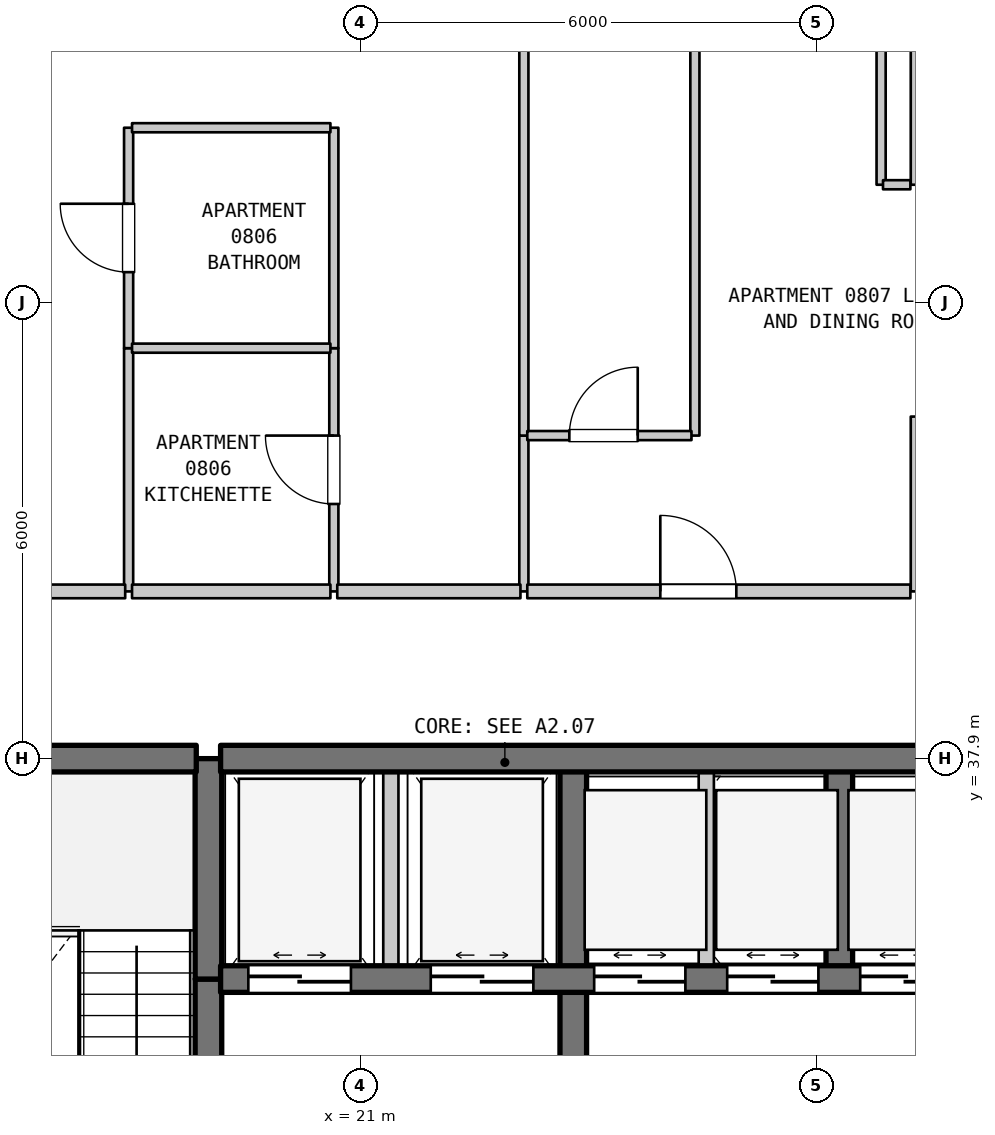
"""IFC4 building model, lengths in metres.
Left out: names, types, materials, properties, quantities, classifications, styles, units other than length and angle.
Written with IfcOpenShell. Run it as: python <this file> out.ifc"""

import sys

from ifc_helpers import new_model, si_unit, direction, frame, frame_2d, origin, place, context, subcontext, project, spatial, rectangle, extrude, element, fill, save


model = new_model("IFC4")
c1 = context("Model", 3, precision=1e-05, world=origin(), true_north=direction((0.0, 1.0)))
c2 = subcontext(c1, "Body", "Model", "MODEL_VIEW")
j1 = project(units=[si_unit("LENGTHUNIT", "METRE"), si_unit("PLANEANGLEUNIT", "RADIAN")], contexts=[c1])
p1 = place(None, origin())
s1 = spatial("IfcSite", under=j1, at=p1, CompositionType="ELEMENT")
p2 = place(p1, origin())
s2 = spatial("IfcBuilding", under=s1, at=p2, CompositionType="ELEMENT")
p3 = place(p2, frame((0.0, 0.0, 38.8)))
s3 = spatial("IfcBuildingStorey", under=s2, at=p3, CompositionType="ELEMENT", Elevation=38.8)
p4 = place(p3, frame((17.95, 40.1, 0.0), z_axis=(0.0, 0.0, 1.0), x_axis=(0.0, 1.0, 0.0)))
e1 = element("IfcWall", 1, at=p4, inside=s3, PredefinedType="PARTITIONING", context=c2, shape_type="SweptSolid", body=[
    extrude(rectangle(XDim=3.2, YDim=0.12, at=frame_2d((1.6, 0.0))), origin(), (0.0, 0.0, 1.0), 3.385),
])
p5 = place(p3, frame((17.95, 43.3, 0.0), z_axis=(0.0, 0.0, 1.0), x_axis=(0.0, 1.0, 0.0)))
e2 = element("IfcWall", 2, at=p5, inside=s3, PredefinedType="PARTITIONING", context=c2, shape_type="SweptSolid", body=[
    extrude(rectangle(XDim=2.9, YDim=0.12, at=frame_2d((1.45, 0.0))), origin(), (0.0, 0.0, 1.0), 3.385),
])
p6 = place(p5, frame((1.0, 0.0, 0.0)))
e3 = element("IfcOpeningElement", 3, at=p6, cuts=e2, PredefinedType="OPENING", context=c2, shape_type="SweptSolid", body=[
    extrude(rectangle(XDim=0.9, YDim=2.1, at=frame_2d((0.45, 1.05))), frame((0.0, 0.07, 0.0), z_axis=(0.0, -1.0, 0.0), x_axis=(1.0, 0.0, 0.0)), (0.0, 0.0, 1.0), 0.14),
])
p7 = place(p3, frame((19.0, 29.5, 0.0), z_axis=(0.0, 0.0, 1.0), x_axis=(0.0, 1.0, 0.0)))
e4 = element("IfcWall", 4, at=p7, inside=s3, PredefinedType="SHEAR", context=c2, shape_type="SweptSolid", body=[
    extrude(rectangle(XDim=5.5, YDim=0.35, at=frame_2d((2.75, 0.0))), origin(), (0.0, 0.0, 1.0), 3.385),
])
p8 = place(p7, frame((2.025, 0.0, 0.0)))
e5 = element("IfcOpeningElement", 5, at=p8, cuts=e4, PredefinedType="OPENING", context=c2, shape_type="SweptSolid", body=[
    extrude(rectangle(XDim=1.1, YDim=2.15, at=frame_2d((0.55, 1.075))), frame((0.0, 0.185, 0.0), z_axis=(0.0, -1.0, 0.0), x_axis=(1.0, 0.0, 0.0)), (0.0, 0.0, 1.0), 0.37),
])
p9 = place(p3, frame((19.0, 35.0, 0.0), z_axis=(0.0, 0.0, 1.0), x_axis=(0.0, 1.0, 0.0)))
e6 = element("IfcWall", 6, at=p9, inside=s3, PredefinedType="SHEAR", context=c2, shape_type="SweptSolid", body=[
    extrude(rectangle(XDim=2.9, YDim=0.35, at=frame_2d((1.45, 0.0))), origin(), (0.0, 0.0, 1.0), 3.385),
])
p10 = place(p3, frame((20.65, 40.1, 0.0), z_axis=(0.0, 0.0, 1.0), x_axis=(0.0, 1.0, 0.0)))
e7 = element("IfcWall", 7, at=p10, inside=s3, PredefinedType="PARTITIONING", context=c2, shape_type="SweptSolid", body=[
    extrude(rectangle(XDim=3.2, YDim=0.12, at=frame_2d((1.6, 0.0))), origin(), (0.0, 0.0, 1.0), 3.385),
])
p11 = place(p10, frame((1.15, 0.0, 0.0)))
e8 = element("IfcOpeningElement", 8, at=p11, cuts=e7, PredefinedType="OPENING", context=c2, shape_type="SweptSolid", body=[
    extrude(rectangle(XDim=0.9, YDim=2.15, at=frame_2d((0.45, 1.075))), frame((0.0, 0.07, 0.0), z_axis=(0.0, -1.0, 0.0), x_axis=(1.0, 0.0, 0.0)), (0.0, 0.0, 1.0), 0.14),
])
p12 = place(p3, frame((20.65, 43.3, 0.0), z_axis=(0.0, 0.0, 1.0), x_axis=(0.0, 1.0, 0.0)))
e9 = element("IfcWall", 9, at=p12, inside=s3, PredefinedType="PARTITIONING", context=c2, shape_type="SweptSolid", body=[
    extrude(rectangle(XDim=2.9, YDim=0.12, at=frame_2d((1.45, 0.0))), origin(), (0.0, 0.0, 1.0), 3.385),
])
p13 = place(p3, frame((21.4, 35.0, 0.0), z_axis=(0.0, 0.0, 1.0), x_axis=(0.0, 1.0, 0.0)))
e10 = element("IfcWall", 10, at=p13, inside=s3, PredefinedType="STANDARD", context=c2, shape_type="SweptSolid", body=[
    extrude(rectangle(XDim=2.9, YDim=0.2, at=frame_2d((1.45, 0.0))), origin(), (0.0, 0.0, 1.0), 3.385),
])
p14 = place(p3, frame((23.15, 40.1, 0.0), z_axis=(0.0, 0.0, 1.0), x_axis=(0.0, 1.0, 0.0)))
e11 = element("IfcWall", 11, at=p14, inside=s3, PredefinedType="PARTITIONING", context=c2, shape_type="SweptSolid", body=[
    extrude(rectangle(XDim=2.05, YDim=0.12, at=frame_2d((1.025, 0.0))), origin(), (0.0, 0.0, 1.0), 3.385),
])
p15 = place(p3, frame((23.15, 42.15, 0.0), z_axis=(0.0, 0.0, 1.0), x_axis=(0.0, 1.0, 0.0)))
e12 = element("IfcWall", 12, at=p15, inside=s3, PredefinedType="PARTITIONING", context=c2, shape_type="SweptSolid", body=[
    extrude(rectangle(XDim=11.74, YDim=0.12, at=frame_2d((5.87, 0.0))), origin(), (0.0, 0.0, 1.0), 3.385),
])
p16 = place(p3, frame((23.8, 31.5, 0.0), z_axis=(0.0, 0.0, 1.0), x_axis=(0.0, 1.0, 0.0)))
e13 = element("IfcWall", 13, at=p16, inside=s3, PredefinedType="SHEAR", context=c2, shape_type="SweptSolid", body=[
    extrude(rectangle(XDim=3.5, YDim=0.35, at=frame_2d((1.75, 0.0))), origin(), (0.0, 0.0, 1.0), 3.385),
])
p17 = place(p16, frame((1.127, 0.0, 0.0)))
e14 = element("IfcOpeningElement", 14, at=p17, cuts=e13, PredefinedType="OPENING", context=c2, shape_type="SweptSolid", body=[
    extrude(rectangle(XDim=1.1, YDim=2.15, at=frame_2d((0.55, 1.075))), frame((0.0, 0.185, 0.0), z_axis=(0.0, -1.0, 0.0), x_axis=(1.0, 0.0, 0.0)), (0.0, 0.0, 1.0), 0.37),
])
p18 = place(p3, frame((23.8, 35.0, 0.0), z_axis=(0.0, 0.0, 1.0), x_axis=(0.0, 1.0, 0.0)))
e15 = element("IfcWall", 15, at=p18, inside=s3, PredefinedType="SHEAR", context=c2, shape_type="SweptSolid", body=[
    extrude(rectangle(XDim=2.9, YDim=0.35, at=frame_2d((1.45, 0.0))), origin(), (0.0, 0.0, 1.0), 3.385),
])
p19 = place(p3, frame((25.4, 42.15, 0.0), z_axis=(0.0, 0.0, 1.0), x_axis=(0.0, 1.0, 0.0)))
e16 = element("IfcWall", 16, at=p19, inside=s3, PredefinedType="PARTITIONING", context=c2, shape_type="SweptSolid", body=[
    extrude(rectangle(XDim=11.74, YDim=0.12, at=frame_2d((5.87, 0.0))), origin(), (0.0, 0.0, 1.0), 3.385),
])
p20 = place(p3, frame((25.55, 35.0, 0.0), z_axis=(0.0, 0.0, 1.0), x_axis=(0.0, 1.0, 0.0)))
e17 = element("IfcWall", 17, at=p20, inside=s3, PredefinedType="STANDARD", context=c2, shape_type="SweptSolid", body=[
    extrude(rectangle(XDim=2.9, YDim=0.2, at=frame_2d((1.45, 0.0))), origin(), (0.0, 0.0, 1.0), 3.385),
])
p21 = place(p3, frame((27.3, 35.0, 0.0), z_axis=(0.0, 0.0, 1.0), x_axis=(0.0, 1.0, 0.0)))
e18 = element("IfcWall", 18, at=p21, inside=s3, PredefinedType="SHEAR", context=c2, shape_type="SweptSolid", body=[
    extrude(rectangle(XDim=2.9, YDim=0.35, at=frame_2d((1.45, 0.0))), origin(), (0.0, 0.0, 1.0), 3.385),
])
p22 = place(p3, frame((27.85, 45.45, 0.0), z_axis=(0.0, 0.0, 1.0), x_axis=(0.0, 1.0, 0.0)))
e19 = element("IfcWall", 19, at=p22, inside=s3, PredefinedType="PARTITIONING", context=c2, shape_type="SweptSolid", body=[
    extrude(rectangle(XDim=8.44, YDim=0.12, at=frame_2d((4.22, 0.0))), origin(), (0.0, 0.0, 1.0), 3.385),
])
p23 = place(p3, frame((28.3, 40.1, 0.0), z_axis=(0.0, 0.0, 1.0), x_axis=(0.0, 1.0, 0.0)))
e20 = element("IfcWall", 20, at=p23, inside=s3, PredefinedType="PARTITIONING", context=c2, shape_type="SweptSolid", body=[
    extrude(rectangle(XDim=2.3, YDim=0.12, at=frame_2d((1.15, 0.0))), origin(), (0.0, 0.0, 1.0), 3.385),
])
p24 = place(p3, frame((28.3, 45.45, 0.0), z_axis=(0.0, 0.0, 1.0), x_axis=(0.0, 1.0, 0.0)))
e21 = element("IfcWall", 21, at=p24, inside=s3, PredefinedType="PARTITIONING", context=c2, shape_type="SweptSolid", body=[
    extrude(rectangle(XDim=8.44, YDim=0.12, at=frame_2d((4.22, 0.0))), origin(), (0.0, 0.0, 1.0), 3.385),
])
p25 = place(p3, frame((19.16, 35.0, 0.0), z_axis=(0.0, 0.0, 1.0), x_axis=(1.0, 0.0, 0.0)))
e22 = element("IfcWall", 22, at=p25, inside=s3, PredefinedType="SHEAR", context=c2, shape_type="SweptSolid", body=[
    extrude(rectangle(XDim=11.48, YDim=0.35, at=frame_2d((5.74, 0.0))), origin(), (0.0, 0.0, 1.0), 3.385),
])
p26 = place(p25, frame((0.365, 0.0, 0.0)))
e23 = element("IfcOpeningElement", 23, at=p26, cuts=e22, PredefinedType="OPENING", context=c2, shape_type="SweptSolid", body=[
    extrude(rectangle(XDim=1.35, YDim=2.2, at=frame_2d((0.675, 1.1))), frame((0.0, 0.185, 0.0), z_axis=(0.0, -1.0, 0.0), x_axis=(1.0, 0.0, 0.0)), (0.0, 0.0, 1.0), 0.37),
])
p27 = place(p25, frame((2.765, 0.0, 0.0)))
e24 = element("IfcOpeningElement", 24, at=p27, cuts=e22, PredefinedType="OPENING", context=c2, shape_type="SweptSolid", body=[
    extrude(rectangle(XDim=1.35, YDim=2.2, at=frame_2d((0.675, 1.1))), frame((0.0, 0.185, 0.0), z_axis=(0.0, -1.0, 0.0), x_axis=(1.0, 0.0, 0.0)), (0.0, 0.0, 1.0), 0.37),
])
p28 = place(p25, frame((4.915, 0.0, 0.0)))
e25 = element("IfcOpeningElement", 25, at=p28, cuts=e22, PredefinedType="OPENING", context=c2, shape_type="SweptSolid", body=[
    extrude(rectangle(XDim=1.2, YDim=2.2, at=frame_2d((0.6, 1.1))), frame((0.0, 0.185, 0.0), z_axis=(0.0, -1.0, 0.0), x_axis=(1.0, 0.0, 0.0)), (0.0, 0.0, 1.0), 0.37),
])
p29 = place(p25, frame((6.665, 0.0, 0.0)))
e26 = element("IfcOpeningElement", 26, at=p29, cuts=e22, PredefinedType="OPENING", context=c2, shape_type="SweptSolid", body=[
    extrude(rectangle(XDim=1.2, YDim=2.2, at=frame_2d((0.6, 1.1))), frame((0.0, 0.185, 0.0), z_axis=(0.0, -1.0, 0.0), x_axis=(1.0, 0.0, 0.0)), (0.0, 0.0, 1.0), 0.37),
])
p30 = place(p25, frame((8.415, 0.0, 0.0)))
e27 = element("IfcOpeningElement", 27, at=p30, cuts=e22, PredefinedType="OPENING", context=c2, shape_type="SweptSolid", body=[
    extrude(rectangle(XDim=1.2, YDim=2.2, at=frame_2d((0.6, 1.1))), frame((0.0, 0.185, 0.0), z_axis=(0.0, -1.0, 0.0), x_axis=(1.0, 0.0, 0.0)), (0.0, 0.0, 1.0), 0.37),
])
p31 = place(p25, frame((10.16, 0.0, 0.0)))
e28 = element("IfcOpeningElement", 28, at=p31, cuts=e22, PredefinedType="OPENING", context=c2, shape_type="SweptSolid", body=[
    extrude(rectangle(XDim=1.2, YDim=2.2, at=frame_2d((0.6, 1.1))), frame((0.0, 0.185, 0.0), z_axis=(0.0, -1.0, 0.0), x_axis=(1.0, 0.0, 0.0)), (0.0, 0.0, 1.0), 0.37),
])
p32 = place(p3, frame((15.16, 37.9, 0.0), z_axis=(0.0, 0.0, 1.0), x_axis=(1.0, 0.0, 0.0)))
e29 = element("IfcWall", 29, at=p32, inside=s3, PredefinedType="SHEAR", context=c2, shape_type="SweptSolid", body=[
    extrude(rectangle(XDim=3.68, YDim=0.35, at=frame_2d((1.84, 0.0))), origin(), (0.0, 0.0, 1.0), 3.385),
])
p33 = place(p3, frame((19.16, 37.9, 0.0), z_axis=(0.0, 0.0, 1.0), x_axis=(1.0, 0.0, 0.0)))
e30 = element("IfcWall", 30, at=p33, inside=s3, PredefinedType="SHEAR", context=c2, shape_type="SweptSolid", body=[
    extrude(rectangle(XDim=11.48, YDim=0.35, at=frame_2d((5.74, 0.0))), origin(), (0.0, 0.0, 1.0), 3.385),
])
p34 = place(p3, frame((12.875, 40.1, 0.0), z_axis=(0.0, 0.0, 1.0), x_axis=(1.0, 0.0, 0.0)))
e31 = element("IfcWall", 31, at=p34, inside=s3, PredefinedType="STANDARD", context=c2, shape_type="SweptSolid", body=[
    extrude(rectangle(XDim=5.03, YDim=0.18, at=frame_2d((2.515, 0.0))), origin(), (0.0, 0.0, 1.0), 3.385),
])
p35 = place(p34, frame((2.0, 0.0, 0.0)))
e32 = element("IfcOpeningElement", 32, at=p35, cuts=e31, PredefinedType="OPENING", context=c2, shape_type="SweptSolid", body=[
    extrude(rectangle(XDim=1.0, YDim=2.15, at=frame_2d((0.5, 1.075))), frame((0.0, 0.1, 0.0), z_axis=(0.0, -1.0, 0.0), x_axis=(1.0, 0.0, 0.0)), (0.0, 0.0, 1.0), 0.2),
])
p36 = place(p3, frame((17.995, 40.1, 0.0), z_axis=(0.0, 0.0, 1.0), x_axis=(1.0, 0.0, 0.0)))
e33 = element("IfcWall", 33, at=p36, inside=s3, PredefinedType="STANDARD", context=c2, shape_type="SweptSolid", body=[
    extrude(rectangle(XDim=2.61, YDim=0.18, at=frame_2d((1.305, 0.0))), origin(), (0.0, 0.0, 1.0), 3.385),
])
p37 = place(p3, frame((20.695, 40.1, 0.0), z_axis=(0.0, 0.0, 1.0), x_axis=(1.0, 0.0, 0.0)))
e34 = element("IfcWall", 34, at=p37, inside=s3, PredefinedType="STANDARD", context=c2, shape_type="SweptSolid", body=[
    extrude(rectangle(XDim=2.41, YDim=0.18, at=frame_2d((1.205, 0.0))), origin(), (0.0, 0.0, 1.0), 3.385),
])
p38 = place(p3, frame((23.195, 40.1, 0.0), z_axis=(0.0, 0.0, 1.0), x_axis=(1.0, 0.0, 0.0)))
e35 = element("IfcWall", 35, at=p38, inside=s3, PredefinedType="STANDARD", context=c2, shape_type="SweptSolid", body=[
    extrude(rectangle(XDim=5.04, YDim=0.18, at=frame_2d((2.52, 0.0))), origin(), (0.0, 0.0, 1.0), 3.385),
])
p39 = place(p38, frame((1.75, 0.0, 0.0)))
e36 = element("IfcOpeningElement", 36, at=p39, cuts=e35, PredefinedType="OPENING", context=c2, shape_type="SweptSolid", body=[
    extrude(rectangle(XDim=1.0, YDim=2.15, at=frame_2d((0.5, 1.075))), frame((0.0, 0.1, 0.0), z_axis=(0.0, -1.0, 0.0), x_axis=(1.0, 0.0, 0.0)), (0.0, 0.0, 1.0), 0.2),
])
p40 = place(p3, frame((23.195, 42.15, 0.0), z_axis=(0.0, 0.0, 1.0), x_axis=(1.0, 0.0, 0.0)))
e37 = element("IfcWall", 37, at=p40, inside=s3, PredefinedType="PARTITIONING", context=c2, shape_type="SweptSolid", body=[
    extrude(rectangle(XDim=2.16, YDim=0.12, at=frame_2d((1.08, 0.0))), origin(), (0.0, 0.0, 1.0), 3.385),
])
p41 = place(p40, frame((0.553, 0.0, 0.0)))
e38 = element("IfcOpeningElement", 38, at=p41, cuts=e37, PredefinedType="OPENING", context=c2, shape_type="SweptSolid", body=[
    extrude(rectangle(XDim=0.9, YDim=2.15, at=frame_2d((0.45, 1.075))), frame((0.0, 0.07, 0.0), z_axis=(0.0, -1.0, 0.0), x_axis=(1.0, 0.0, 0.0)), (0.0, 0.0, 1.0), 0.14),
])
p42 = place(p3, frame((17.995, 43.3, 0.0), z_axis=(0.0, 0.0, 1.0), x_axis=(1.0, 0.0, 0.0)))
e39 = element("IfcWall", 39, at=p42, inside=s3, PredefinedType="PARTITIONING", context=c2, shape_type="SweptSolid", body=[
    extrude(rectangle(XDim=2.61, YDim=0.12, at=frame_2d((1.305, 0.0))), origin(), (0.0, 0.0, 1.0), 3.385),
])
p43 = place(p3, frame((27.875, 45.45, 0.0), z_axis=(0.0, 0.0, 1.0), x_axis=(1.0, 0.0, 0.0)))
e40 = element("IfcWall", 40, at=p43, inside=s3, PredefinedType="PARTITIONING", context=c2, shape_type="SweptSolid", body=[
    extrude(rectangle(XDim=0.36, YDim=0.12, at=frame_2d((0.18, 0.0))), origin(), (0.0, 0.0, 1.0), 3.385),
])
p44 = place(p3, frame((17.995, 46.2, 0.0), z_axis=(0.0, 0.0, 1.0), x_axis=(1.0, 0.0, 0.0)))
e41 = element("IfcWall", 41, at=p44, inside=s3, PredefinedType="PARTITIONING", context=c2, shape_type="SweptSolid", body=[
    extrude(rectangle(XDim=2.61, YDim=0.12, at=frame_2d((1.305, 0.0))), origin(), (0.0, 0.0, 1.0), 3.385),
])
p45 = place(p6, origin())
e42 = element("IfcDoor", 42, at=p45, inside=s3, OperationType="SINGLE_SWING_RIGHT", PredefinedType="DOOR", context=c2, shape_type="SweptSolid", body=[
    extrude(rectangle(XDim=0.9, YDim=2.1, at=frame_2d((0.45, 1.05))), frame((0.0, 0.025, 0.0), z_axis=(0.0, -1.0, 0.0), x_axis=(1.0, 0.0, 0.0)), (0.0, 0.0, 1.0), 0.05),
])
fill(e3, e42)
p46 = place(p11, origin())
e43 = element("IfcDoor", 43, at=p46, inside=s3, OperationType="SINGLE_SWING_RIGHT", PredefinedType="DOOR", context=c2, shape_type="SweptSolid", body=[
    extrude(rectangle(XDim=0.9, YDim=2.15, at=frame_2d((0.45, 1.075))), frame((0.0, 0.025, 0.0), z_axis=(0.0, -1.0, 0.0), x_axis=(1.0, 0.0, 0.0)), (0.0, 0.0, 1.0), 0.05),
])
fill(e8, e43)
p47 = place(p26, origin())
e44 = element("IfcDoor", 44, at=p47, inside=s3, OperationType="DOUBLE_DOOR_SLIDING", PredefinedType="DOOR", context=c2, shape_type="SweptSolid", body=[
    extrude(rectangle(XDim=1.35, YDim=2.2, at=frame_2d((0.675, 1.1))), frame((0.0, 0.025, 0.0), z_axis=(0.0, -1.0, 0.0), x_axis=(1.0, 0.0, 0.0)), (0.0, 0.0, 1.0), 0.05),
])
fill(e23, e44)
p48 = place(p27, origin())
e45 = element("IfcDoor", 45, at=p48, inside=s3, OperationType="DOUBLE_DOOR_SLIDING", PredefinedType="DOOR", context=c2, shape_type="SweptSolid", body=[
    extrude(rectangle(XDim=1.35, YDim=2.2, at=frame_2d((0.675, 1.1))), frame((0.0, 0.025, 0.0), z_axis=(0.0, -1.0, 0.0), x_axis=(1.0, 0.0, 0.0)), (0.0, 0.0, 1.0), 0.05),
])
fill(e24, e45)
p49 = place(p28, origin())
e46 = element("IfcDoor", 46, at=p49, inside=s3, OperationType="DOUBLE_DOOR_SLIDING", PredefinedType="DOOR", context=c2, shape_type="SweptSolid", body=[
    extrude(rectangle(XDim=1.2, YDim=2.2, at=frame_2d((0.6, 1.1))), frame((0.0, 0.025, 0.0), z_axis=(0.0, -1.0, 0.0), x_axis=(1.0, 0.0, 0.0)), (0.0, 0.0, 1.0), 0.05),
])
fill(e25, e46)
p50 = place(p29, origin())
e47 = element("IfcDoor", 47, at=p50, inside=s3, OperationType="DOUBLE_DOOR_SLIDING", PredefinedType="DOOR", context=c2, shape_type="SweptSolid", body=[
    extrude(rectangle(XDim=1.2, YDim=2.2, at=frame_2d((0.6, 1.1))), frame((0.0, 0.025, 0.0), z_axis=(0.0, -1.0, 0.0), x_axis=(1.0, 0.0, 0.0)), (0.0, 0.0, 1.0), 0.05),
])
fill(e26, e47)
p51 = place(p30, origin())
e48 = element("IfcDoor", 48, at=p51, inside=s3, OperationType="DOUBLE_DOOR_SLIDING", PredefinedType="DOOR", context=c2, shape_type="SweptSolid", body=[
    extrude(rectangle(XDim=1.2, YDim=2.2, at=frame_2d((0.6, 1.1))), frame((0.0, 0.025, 0.0), z_axis=(0.0, -1.0, 0.0), x_axis=(1.0, 0.0, 0.0)), (0.0, 0.0, 1.0), 0.05),
])
fill(e27, e48)
p52 = place(p39, origin())
e49 = element("IfcDoor", 49, at=p52, inside=s3, OperationType="SINGLE_SWING_LEFT", PredefinedType="DOOR", context=c2, shape_type="SweptSolid", body=[
    extrude(rectangle(XDim=1.0, YDim=2.15, at=frame_2d((0.5, 1.075))), frame((0.0, 0.025, 0.0), z_axis=(0.0, -1.0, 0.0), x_axis=(1.0, 0.0, 0.0)), (0.0, 0.0, 1.0), 0.05),
])
fill(e36, e49)
p53 = place(p41, origin())
e50 = element("IfcDoor", 50, at=p53, inside=s3, OperationType="SINGLE_SWING_RIGHT", PredefinedType="DOOR", context=c2, shape_type="SweptSolid", body=[
    extrude(rectangle(XDim=0.9, YDim=2.15, at=frame_2d((0.45, 1.075))), frame((0.0, 0.025, 0.0), z_axis=(0.0, -1.0, 0.0), x_axis=(1.0, 0.0, 0.0)), (0.0, 0.0, 1.0), 0.05),
])
fill(e38, e50)
save(model, sys.argv[1])
